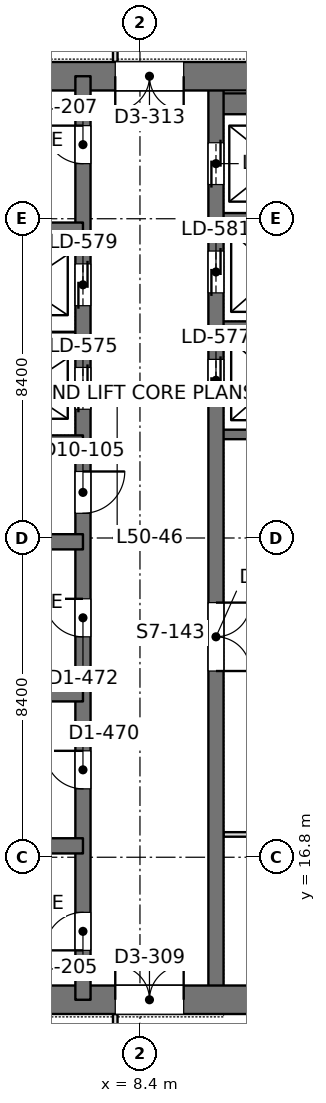
"""IFC4 building model, lengths in metres.
Left out: names, types, materials, properties, quantities, classifications, styles, units other than length and angle.
Written with IfcOpenShell. Run it as: python <this file> out.ifc"""

import sys

from ifc_helpers import new_model, si_unit, direction, frame, frame_2d, origin, place, context, subcontext, project, spatial, rectangle, extrude, element, fill, save


model = new_model("IFC4")
c1 = context("Model", 3, precision=1e-05, world=origin(), true_north=direction((0.0, 1.0)))
c2 = subcontext(c1, "Body", "Model", "MODEL_VIEW")
j1 = project(units=[si_unit("LENGTHUNIT", "METRE"), si_unit("PLANEANGLEUNIT", "RADIAN")], contexts=[c1])
p1 = place(None, origin())
s1 = spatial("IfcSite", under=j1, at=p1, CompositionType="ELEMENT")
p2 = place(p1, origin())
s2 = spatial("IfcBuilding", under=s1, at=p2, CompositionType="ELEMENT")
p3 = place(p2, frame((0.0, 0.0, 219.6)))
s3 = spatial("IfcBuildingStorey", under=s2, at=p3, CompositionType="ELEMENT", Elevation=219.6)
p4 = place(p3, frame((-1.125, 13.05, 0.0), z_axis=(0.0, 0.0, 1.0), x_axis=(1.0, 0.0, 0.0)))
e1 = element("IfcWall", 1, at=p4, inside=s3, PredefinedType="SHEAR", context=c2, shape_type="SweptSolid", body=[
    extrude(rectangle(XDim=17.85, YDim=0.75, at=frame_2d((8.925, 0.0))), origin(), (0.0, 0.0, 1.0), 4.2),
])
p5 = place(p4, frame((8.875, 0.0, 0.0)))
e2 = element("IfcOpeningElement", 2, at=p5, cuts=e1, PredefinedType="OPENING", context=c2, shape_type="SweptSolid", body=[
    extrude(rectangle(XDim=1.8, YDim=2.4, at=frame_2d((0.9, 1.2))), frame((0.0, 0.385, 0.0), z_axis=(0.0, -1.0, 0.0), x_axis=(1.0, 0.0, 0.0)), (0.0, 0.0, 1.0), 0.77),
])
p6 = place(p3, frame((-1.125, 37.35, 0.0), z_axis=(0.0, 0.0, 1.0), x_axis=(1.0, 0.0, 0.0)))
e3 = element("IfcWall", 3, at=p6, inside=s3, PredefinedType="SHEAR", context=c2, shape_type="SweptSolid", body=[
    extrude(rectangle(XDim=17.85, YDim=0.75, at=frame_2d((8.925, 0.0))), origin(), (0.0, 0.0, 1.0), 4.2),
])
p7 = place(p6, frame((8.875, 0.0, 0.0)))
e4 = element("IfcOpeningElement", 4, at=p7, cuts=e3, PredefinedType="OPENING", context=c2, shape_type="SweptSolid", body=[
    extrude(rectangle(XDim=1.8, YDim=2.4, at=frame_2d((0.9, 1.2))), frame((0.0, 0.385, 0.0), z_axis=(0.0, -1.0, 0.0), x_axis=(1.0, 0.0, 0.0)), (0.0, 0.0, 1.0), 0.77),
])
p8 = place(p3, frame((6.9, 13.05, 0.0), z_axis=(0.0, 0.0, 1.0), x_axis=(0.0, 1.0, 0.0)))
e5 = element("IfcWall", 5, at=p8, inside=s3, PredefinedType="SHEAR", context=c2, shape_type="SweptSolid", body=[
    extrude(rectangle(XDim=24.3, YDim=0.4, at=frame_2d((12.15, 0.0))), origin(), (0.0, 0.0, 1.0), 4.2),
])
p9 = place(p8, frame((1.3, 0.0, 0.0)))
e6 = element("IfcOpeningElement", 6, at=p9, cuts=e5, PredefinedType="OPENING", context=c2, shape_type="SweptSolid", body=[
    extrude(rectangle(XDim=1.0, YDim=2.2, at=frame_2d((0.5, 1.1))), frame((0.0, 0.21, 0.0), z_axis=(0.0, -1.0, 0.0), x_axis=(1.0, 0.0, 0.0)), (0.0, 0.0, 1.0), 0.42),
])
p10 = place(p8, frame((22.0, 0.0, 0.0)))
e7 = element("IfcOpeningElement", 7, at=p10, cuts=e5, PredefinedType="OPENING", context=c2, shape_type="SweptSolid", body=[
    extrude(rectangle(XDim=1.0, YDim=2.2, at=frame_2d((0.5, 1.1))), frame((0.0, 0.21, 0.0), z_axis=(0.0, -1.0, 0.0), x_axis=(1.0, 0.0, 0.0)), (0.0, 0.0, 1.0), 0.42),
])
p11 = place(p8, frame((5.55, 0.0, 0.0)))
e8 = element("IfcOpeningElement", 8, at=p11, cuts=e5, PredefinedType="OPENING", context=c2, shape_type="SweptSolid", body=[
    extrude(rectangle(XDim=1.0, YDim=2.2, at=frame_2d((0.5, 1.1))), frame((0.0, 0.21, 0.0), z_axis=(0.0, -1.0, 0.0), x_axis=(1.0, 0.0, 0.0)), (0.0, 0.0, 1.0), 0.42),
])
p12 = place(p8, frame((9.55, 0.0, 0.0)))
e9 = element("IfcOpeningElement", 9, at=p12, cuts=e5, PredefinedType="OPENING", context=c2, shape_type="SweptSolid", body=[
    extrude(rectangle(XDim=1.0, YDim=2.2, at=frame_2d((0.5, 1.1))), frame((0.0, 0.21, 0.0), z_axis=(0.0, -1.0, 0.0), x_axis=(1.0, 0.0, 0.0)), (0.0, 0.0, 1.0), 0.42),
])
p13 = place(p8, frame((12.8, 0.0, 0.0)))
e10 = element("IfcOpeningElement", 10, at=p13, cuts=e5, PredefinedType="OPENING", context=c2, shape_type="SweptSolid", body=[
    extrude(rectangle(XDim=1.1, YDim=2.2, at=frame_2d((0.55, 1.1))), frame((0.0, 0.21, 0.0), z_axis=(0.0, -1.0, 0.0), x_axis=(1.0, 0.0, 0.0)), (0.0, 0.0, 1.0), 0.42),
])
p14 = place(p8, frame((15.538, 0.0, 0.0)))
e11 = element("IfcOpeningElement", 11, at=p14, cuts=e5, PredefinedType="OPENING", context=c2, shape_type="SweptSolid", body=[
    extrude(rectangle(XDim=1.1, YDim=2.2, at=frame_2d((0.55, 1.1))), frame((0.0, 0.21, 0.0), z_axis=(0.0, -1.0, 0.0), x_axis=(1.0, 0.0, 0.0)), (0.0, 0.0, 1.0), 0.42),
])
p15 = place(p8, frame((18.262, 0.0, 0.0)))
e12 = element("IfcOpeningElement", 12, at=p15, cuts=e5, PredefinedType="OPENING", context=c2, shape_type="SweptSolid", body=[
    extrude(rectangle(XDim=1.1, YDim=2.2, at=frame_2d((0.55, 1.1))), frame((0.0, 0.21, 0.0), z_axis=(0.0, -1.0, 0.0), x_axis=(1.0, 0.0, 0.0)), (0.0, 0.0, 1.0), 0.42),
])
p16 = place(p3, frame((10.4, 13.05, 0.0), z_axis=(0.0, 0.0, 1.0), x_axis=(0.0, 1.0, 0.0)))
e13 = element("IfcWall", 13, at=p16, inside=s3, PredefinedType="SHEAR", context=c2, shape_type="SweptSolid", body=[
    extrude(rectangle(XDim=24.3, YDim=0.4, at=frame_2d((12.15, 0.0))), origin(), (0.0, 0.0, 1.0), 4.2),
])
p17 = place(p16, frame((15.75, 0.0, 0.0)))
e14 = element("IfcOpeningElement", 14, at=p17, cuts=e13, PredefinedType="OPENING", context=c2, shape_type="SweptSolid", body=[
    extrude(rectangle(XDim=1.1, YDim=2.2, at=frame_2d((0.55, 1.1))), frame((0.0, 0.21, 0.0), z_axis=(0.0, -1.0, 0.0), x_axis=(1.0, 0.0, 0.0)), (0.0, 0.0, 1.0), 0.42),
])
p18 = place(p16, frame((18.6, 0.0, 0.0)))
e15 = element("IfcOpeningElement", 15, at=p18, cuts=e13, PredefinedType="OPENING", context=c2, shape_type="SweptSolid", body=[
    extrude(rectangle(XDim=1.1, YDim=2.2, at=frame_2d((0.55, 1.1))), frame((0.0, 0.21, 0.0), z_axis=(0.0, -1.0, 0.0), x_axis=(1.0, 0.0, 0.0)), (0.0, 0.0, 1.0), 0.42),
])
p19 = place(p16, frame((21.45, 0.0, 0.0)))
e16 = element("IfcOpeningElement", 16, at=p19, cuts=e13, PredefinedType="OPENING", context=c2, shape_type="SweptSolid", body=[
    extrude(rectangle(XDim=1.1, YDim=2.2, at=frame_2d((0.55, 1.1))), frame((0.0, 0.21, 0.0), z_axis=(0.0, -1.0, 0.0), x_axis=(1.0, 0.0, 0.0)), (0.0, 0.0, 1.0), 0.42),
])
p20 = place(p16, frame((8.65, 0.0, 0.0)))
e17 = element("IfcOpeningElement", 17, at=p20, cuts=e13, PredefinedType="OPENING", context=c2, shape_type="SweptSolid", body=[
    extrude(rectangle(XDim=1.8, YDim=2.4, at=frame_2d((0.9, 1.2))), frame((0.0, 0.21, 0.0), z_axis=(0.0, -1.0, 0.0), x_axis=(1.0, 0.0, 0.0)), (0.0, 0.0, 1.0), 0.42),
])
for number, where, z_axis, x_axis in (
    (18, (-0.75, 17.1, 0.0), (0.0, 0.0, 1.0), (1.0, 0.0, 0.0)),
    (19, (-0.75, 21.1, 0.0), (0.0, 0.0, 1.0), (1.0, 0.0, 0.0)),
    (20, (-0.75, 25.1, 0.0), (0.0, 0.0, 1.0), (1.0, 0.0, 0.0)),
    (21, (-0.75, 27.7, 0.0), (0.0, 0.0, 1.0), (1.0, 0.0, 0.0)),
    (22, (-0.75, 33.3, 0.0), (0.0, 0.0, 1.0), (1.0, 0.0, 0.0)),
):
    element("IfcWall", number, at=place(p3, frame(where, z_axis=z_axis, x_axis=x_axis)), inside=s3, PredefinedType="SHEAR", context=c2, shape_type="SweptSolid", body=[
        extrude(rectangle(XDim=7.65, YDim=0.4, at=frame_2d((3.825, 0.0))), origin(), (0.0, 0.0, 1.0), 4.2),
    ])
p21 = place(p3, frame((3.7, 30.5, 0.0), z_axis=(0.0, 0.0, 1.0), x_axis=(1.0, 0.0, 0.0)))
e23 = element("IfcWall", 23, at=p21, inside=s3, PredefinedType="SHEAR", context=c2, shape_type="SweptSolid", body=[
    extrude(rectangle(XDim=3.2, YDim=0.25, at=frame_2d((1.6, 0.0))), origin(), (0.0, 0.0, 1.0), 4.2),
])
p22 = place(p3, frame((10.4, 27.925, 0.0), z_axis=(0.0, 0.0, 1.0), x_axis=(1.0, 0.0, 0.0)))
e24 = element("IfcWall", 24, at=p22, inside=s3, PredefinedType="SHEAR", context=c2, shape_type="SweptSolid", body=[
    extrude(rectangle(XDim=5.95, YDim=0.25, at=frame_2d((2.975, 0.0))), origin(), (0.0, 0.0, 1.0), 4.2),
])
for number, where, z_axis, x_axis in (
    (25, (10.4, 30.775, 0.0), (0.0, 0.0, 1.0), (1.0, 0.0, 0.0)),
    (26, (10.4, 33.625, 0.0), (0.0, 0.0, 1.0), (1.0, 0.0, 0.0)),
):
    element("IfcWall", number, at=place(p3, frame(where, z_axis=z_axis, x_axis=x_axis)), inside=s3, PredefinedType="SHEAR", context=c2, shape_type="SweptSolid", body=[
        extrude(rectangle(XDim=3.2, YDim=0.25, at=frame_2d((1.6, 0.0))), origin(), (0.0, 0.0, 1.0), 4.2),
    ])
p23 = place(p3, frame((10.4, 36.625, 0.0), z_axis=(0.0, 0.0, 1.0), x_axis=(1.0, 0.0, 0.0)))
e27 = element("IfcWall", 27, at=p23, inside=s3, PredefinedType="SHEAR", context=c2, shape_type="SweptSolid", body=[
    extrude(rectangle(XDim=3.2, YDim=0.55, at=frame_2d((1.6, 0.0))), origin(), (0.0, 0.0, 1.0), 4.2),
])
p24 = place(p3, frame((10.598, 17.4, 0.0), z_axis=(0.0, 0.0, 1.0), x_axis=(1.0, 0.0, 0.0)))
e28 = element("IfcWall", 28, at=p24, inside=s3, PredefinedType="PARTITIONING", context=c2, shape_type="SweptSolid", body=[
    extrude(rectangle(XDim=5.904, YDim=0.12, at=frame_2d((2.952, 0.0))), origin(), (0.0, 0.0, 1.0), 3.55),
])
p25 = place(p3, frame((7.75, 11.158, 0.0), z_axis=(0.0, 0.0, 1.0), x_axis=(0.0, 1.0, 0.0)))
e29 = element("IfcWall", 29, at=p25, inside=s3, PredefinedType="PARTITIONING", context=c2, shape_type="SweptSolid", body=[
    extrude(rectangle(XDim=1.518, YDim=0.12, at=frame_2d((0.759, 0.0))), origin(), (0.0, 0.0, 1.0), 4.05),
])
p26 = place(p25, frame((0.192, 0.0, 0.0)))
e30 = element("IfcOpeningElement", 30, at=p26, cuts=e29, PredefinedType="OPENING", context=c2, shape_type="SweptSolid", body=[
    extrude(rectangle(XDim=1.0, YDim=2.4, at=frame_2d((0.5, 1.2))), frame((0.0, 0.07, 0.0), z_axis=(0.0, -1.0, 0.0), x_axis=(1.0, 0.0, 0.0)), (0.0, 0.0, 1.0), 0.14),
])
p27 = place(p3, frame((7.75, 37.724, 0.0), z_axis=(0.0, 0.0, 1.0), x_axis=(0.0, 1.0, 0.0)))
e31 = element("IfcWall", 31, at=p27, inside=s3, PredefinedType="PARTITIONING", context=c2, shape_type="SweptSolid", body=[
    extrude(rectangle(XDim=1.518, YDim=0.12, at=frame_2d((0.759, 0.0))), origin(), (0.0, 0.0, 1.0), 4.05),
])
p28 = place(p27, frame((0.326, 0.0, 0.0)))
e32 = element("IfcOpeningElement", 32, at=p28, cuts=e31, PredefinedType="OPENING", context=c2, shape_type="SweptSolid", body=[
    extrude(rectangle(XDim=1.0, YDim=2.4, at=frame_2d((0.5, 1.2))), frame((0.0, 0.07, 0.0), z_axis=(0.0, -1.0, 0.0), x_axis=(1.0, 0.0, 0.0)), (0.0, 0.0, 1.0), 0.14),
])
p29 = place(p5, origin())
e33 = element("IfcDoor", 33, at=p29, inside=s3, OperationType="DOUBLE_DOOR_SINGLE_SWING", PredefinedType="DOOR", context=c2, shape_type="SweptSolid", body=[
    extrude(rectangle(XDim=1.8, YDim=2.4, at=frame_2d((0.9, 1.2))), frame((0.0, 0.025, 0.0), z_axis=(0.0, -1.0, 0.0), x_axis=(1.0, 0.0, 0.0)), (0.0, 0.0, 1.0), 0.05),
])
fill(e2, e33)
p30 = place(p7, frame((1.8, 0.0, 0.0), z_axis=(0.0, 0.0, 1.0), x_axis=(-1.0, 0.0, 0.0)))
e34 = element("IfcDoor", 34, at=p30, inside=s3, OperationType="DOUBLE_DOOR_SINGLE_SWING", PredefinedType="DOOR", context=c2, shape_type="SweptSolid", body=[
    extrude(rectangle(XDim=1.8, YDim=2.4, at=frame_2d((0.9, 1.2))), frame((0.0, 0.025, 0.0), z_axis=(0.0, -1.0, 0.0), x_axis=(1.0, 0.0, 0.0)), (0.0, 0.0, 1.0), 0.05),
])
fill(e4, e34)
p31 = place(p9, origin())
e35 = element("IfcDoor", 35, at=p31, inside=s3, OperationType="SINGLE_SWING_LEFT", PredefinedType="DOOR", context=c2, shape_type="SweptSolid", body=[
    extrude(rectangle(XDim=1.0, YDim=2.2, at=frame_2d((0.5, 1.1))), frame((0.0, 0.025, 0.0), z_axis=(0.0, -1.0, 0.0), x_axis=(1.0, 0.0, 0.0)), (0.0, 0.0, 1.0), 0.05),
])
fill(e6, e35)
p32 = place(p10, origin())
e36 = element("IfcDoor", 36, at=p32, inside=s3, OperationType="SINGLE_SWING_RIGHT", PredefinedType="DOOR", context=c2, shape_type="SweptSolid", body=[
    extrude(rectangle(XDim=1.0, YDim=2.2, at=frame_2d((0.5, 1.1))), frame((0.0, 0.025, 0.0), z_axis=(0.0, -1.0, 0.0), x_axis=(1.0, 0.0, 0.0)), (0.0, 0.0, 1.0), 0.05),
])
fill(e7, e36)
p33 = place(p11, origin())
e37 = element("IfcDoor", 37, at=p33, inside=s3, OperationType="SINGLE_SWING_RIGHT", PredefinedType="DOOR", context=c2, shape_type="SweptSolid", body=[
    extrude(rectangle(XDim=1.0, YDim=2.2, at=frame_2d((0.5, 1.1))), frame((0.0, 0.025, 0.0), z_axis=(0.0, -1.0, 0.0), x_axis=(1.0, 0.0, 0.0)), (0.0, 0.0, 1.0), 0.05),
])
fill(e8, e37)
p34 = place(p12, origin())
e38 = element("IfcDoor", 38, at=p34, inside=s3, OperationType="SINGLE_SWING_RIGHT", PredefinedType="DOOR", context=c2, shape_type="SweptSolid", body=[
    extrude(rectangle(XDim=1.0, YDim=2.2, at=frame_2d((0.5, 1.1))), frame((0.0, 0.025, 0.0), z_axis=(0.0, -1.0, 0.0), x_axis=(1.0, 0.0, 0.0)), (0.0, 0.0, 1.0), 0.05),
])
fill(e9, e38)
p35 = place(p13, frame((1.1, 0.0, 0.0), z_axis=(0.0, 0.0, 1.0), x_axis=(-1.0, 0.0, 0.0)))
e39 = element("IfcDoor", 39, at=p35, inside=s3, OperationType="SINGLE_SWING_LEFT", PredefinedType="DOOR", context=c2, shape_type="SweptSolid", body=[
    extrude(rectangle(XDim=1.1, YDim=2.2, at=frame_2d((0.55, 1.1))), frame((0.0, 0.025, 0.0), z_axis=(0.0, -1.0, 0.0), x_axis=(1.0, 0.0, 0.0)), (0.0, 0.0, 1.0), 0.05),
])
fill(e10, e39)
p36 = place(p17, origin())
e40 = element("IfcDoor", 40, at=p36, inside=s3, OperationType="DOUBLE_DOOR_SLIDING", PredefinedType="DOOR", context=c2, shape_type="SweptSolid", body=[
    extrude(rectangle(XDim=1.1, YDim=2.2, at=frame_2d((0.55, 1.1))), frame((0.0, 0.025, 0.0), z_axis=(0.0, -1.0, 0.0), x_axis=(1.0, 0.0, 0.0)), (0.0, 0.0, 1.0), 0.05),
])
fill(e14, e40)
p37 = place(p18, origin())
e41 = element("IfcDoor", 41, at=p37, inside=s3, OperationType="DOUBLE_DOOR_SLIDING", PredefinedType="DOOR", context=c2, shape_type="SweptSolid", body=[
    extrude(rectangle(XDim=1.1, YDim=2.2, at=frame_2d((0.55, 1.1))), frame((0.0, 0.025, 0.0), z_axis=(0.0, -1.0, 0.0), x_axis=(1.0, 0.0, 0.0)), (0.0, 0.0, 1.0), 0.05),
])
fill(e15, e41)
p38 = place(p19, origin())
e42 = element("IfcDoor", 42, at=p38, inside=s3, OperationType="DOUBLE_DOOR_SLIDING", PredefinedType="DOOR", context=c2, shape_type="SweptSolid", body=[
    extrude(rectangle(XDim=1.1, YDim=2.2, at=frame_2d((0.55, 1.1))), frame((0.0, 0.025, 0.0), z_axis=(0.0, -1.0, 0.0), x_axis=(1.0, 0.0, 0.0)), (0.0, 0.0, 1.0), 0.05),
])
fill(e16, e42)
p39 = place(p14, origin())
e43 = element("IfcDoor", 43, at=p39, inside=s3, OperationType="DOUBLE_DOOR_SLIDING", PredefinedType="DOOR", context=c2, shape_type="SweptSolid", body=[
    extrude(rectangle(XDim=1.1, YDim=2.2, at=frame_2d((0.55, 1.1))), frame((0.0, 0.025, 0.0), z_axis=(0.0, -1.0, 0.0), x_axis=(1.0, 0.0, 0.0)), (0.0, 0.0, 1.0), 0.05),
])
fill(e11, e43)
p40 = place(p15, origin())
e44 = element("IfcDoor", 44, at=p40, inside=s3, OperationType="DOUBLE_DOOR_SLIDING", PredefinedType="DOOR", context=c2, shape_type="SweptSolid", body=[
    extrude(rectangle(XDim=1.1, YDim=2.2, at=frame_2d((0.55, 1.1))), frame((0.0, 0.025, 0.0), z_axis=(0.0, -1.0, 0.0), x_axis=(1.0, 0.0, 0.0)), (0.0, 0.0, 1.0), 0.05),
])
fill(e12, e44)
p41 = place(p20, frame((1.8, 0.0, 0.0), z_axis=(0.0, 0.0, 1.0), x_axis=(-1.0, 0.0, 0.0)))
e45 = element("IfcDoor", 45, at=p41, inside=s3, OperationType="DOUBLE_DOOR_SINGLE_SWING", PredefinedType="DOOR", context=c2, shape_type="SweptSolid", body=[
    extrude(rectangle(XDim=1.8, YDim=2.4, at=frame_2d((0.9, 1.2))), frame((0.0, 0.025, 0.0), z_axis=(0.0, -1.0, 0.0), x_axis=(1.0, 0.0, 0.0)), (0.0, 0.0, 1.0), 0.05),
])
fill(e17, e45)
save(model, sys.argv[1])
